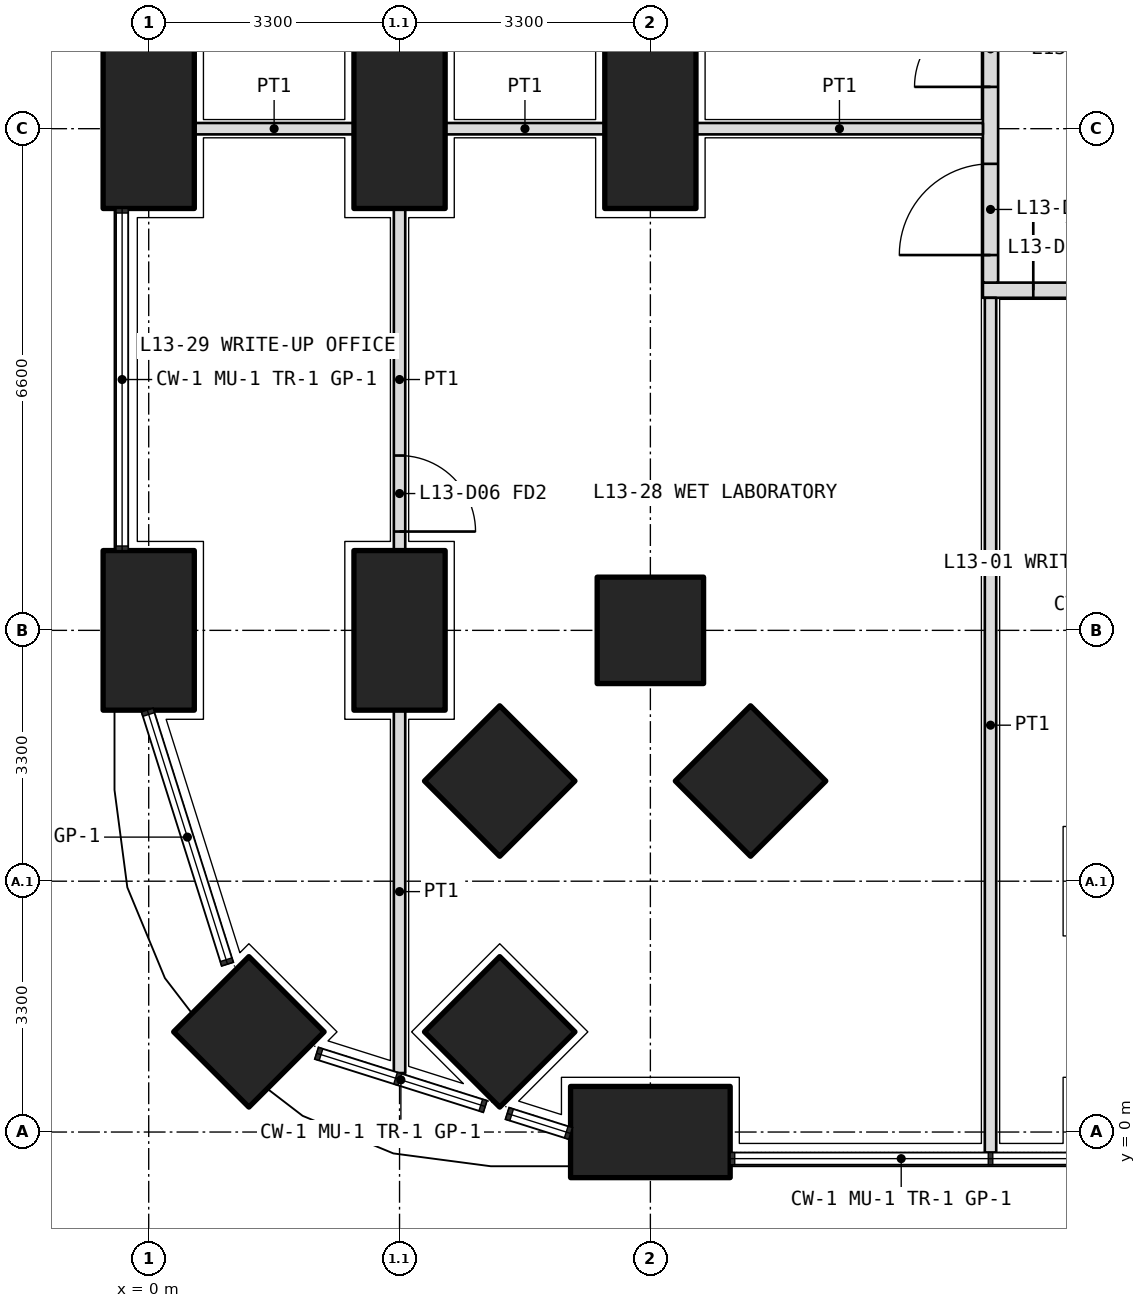
"""IFC4 building model, lengths in metres.
Left out: names, types, materials, properties, quantities, classifications, styles, units other than length and angle.
Written with IfcOpenShell. Run it as: python <this file> out.ifc"""

import sys

from ifc_helpers import new_model, si_unit, direction, frame, frame_2d, origin, origin_2d, place, context, subcontext, project, spatial, rectangle, extrude, element, fill, save


model = new_model("IFC4")
c1 = context("Model", 3, precision=1e-05, world=origin(), true_north=direction((0.0, 1.0)))
c2 = subcontext(c1, "Body", "Model", "MODEL_VIEW")
j1 = project(units=[si_unit("LENGTHUNIT", "METRE"), si_unit("PLANEANGLEUNIT", "RADIAN")], contexts=[c1])
p1 = place(None, origin())
s1 = spatial("IfcSite", under=j1, at=p1, CompositionType="ELEMENT")
p2 = place(p1, origin())
s2 = spatial("IfcBuilding", under=s1, at=p2, CompositionType="ELEMENT")
p3 = place(p2, frame((0.0, 0.0, 59.1)))
s3 = spatial("IfcBuildingStorey", under=s2, at=p3, CompositionType="ELEMENT", Elevation=59.1)
p4 = place(p3, frame((1.318, 1.318, 0.0), z_axis=(0.0, 0.0, 1.0), x_axis=(0.707106781187, 0.707106781187, 0.0)))
e1 = element("IfcColumn", 1, at=p4, inside=s3, PredefinedType="COLUMN", context=c2, shape_type="SweptSolid", body=[
    extrude(rectangle(XDim=1.4, YDim=1.4, at=origin_2d()), origin(), (0.0, 0.0, 1.0), 4.2),
])
for number, where, z_axis, x_axis in (
    (2, (6.6, 0.0, 0.0), (0.0, 0.0, 1.0), (1.0, 0.0, 0.0)),
    (3, (0.0, 6.6, 0.0), (0.0, 0.0, 1.0), (0.0, 1.0, 0.0)),
    (4, (0.0, 13.2, 0.0), (0.0, 0.0, 1.0), (0.0, 1.0, 0.0)),
):
    element("IfcColumn", number, at=place(p3, frame(where, z_axis=z_axis, x_axis=x_axis)), inside=s3, PredefinedType="COLUMN", context=c2, shape_type="SweptSolid", body=[
        extrude(rectangle(XDim=2.1, YDim=1.2, at=origin_2d()), origin(), (0.0, 0.0, 1.0), 4.2),
    ])
for number, where, z_axis, x_axis in (
    (5, (6.6, 6.6, 0.0), (0.0, 0.0, 1.0), (1.0, 0.0, 0.0)),
    (6, (4.618, 1.318, 0.0), (0.0, 0.0, 1.0), (0.707, 0.707, 0.0)),
):
    element("IfcColumn", number, at=place(p3, frame(where, z_axis=z_axis, x_axis=x_axis)), inside=s3, PredefinedType="COLUMN", context=c2, shape_type="SweptSolid", body=[
        extrude(rectangle(XDim=1.4, YDim=1.4, at=origin_2d()), origin(), (0.0, 0.0, 1.0), 4.2),
    ])
for number, where, z_axis, x_axis in (
    (7, (3.3, 6.6, 0.0), (0.0, 0.0, 1.0), (0.0, 1.0, 0.0)),
    (8, (3.3, 13.2, 0.0), (0.0, 0.0, 1.0), (0.0, 1.0, 0.0)),
):
    element("IfcColumn", number, at=place(p3, frame(where, z_axis=z_axis, x_axis=x_axis)), inside=s3, PredefinedType="COLUMN", context=c2, shape_type="SweptSolid", body=[
        extrude(rectangle(XDim=2.1, YDim=1.2, at=origin_2d()), origin(), (0.0, 0.0, 1.0), 4.2),
    ])
for number, where, z_axis, x_axis in (
    (9, (4.618, 4.618, 0.0), (0.0, 0.0, 1.0), (0.707, 0.707, 0.0)),
    (10, (7.918, 4.618, 0.0), (0.0, 0.0, 1.0), (0.707, 0.707, 0.0)),
):
    element("IfcColumn", number, at=place(p3, frame(where, z_axis=z_axis, x_axis=x_axis)), inside=s3, PredefinedType="COLUMN", context=c2, shape_type="SweptSolid", body=[
        extrude(rectangle(XDim=1.4, YDim=1.4, at=origin_2d()), origin(), (0.0, 0.0, 1.0), 4.2),
    ])
p5 = place(p3, frame((6.6, 13.2, 0.0), z_axis=(0.0, 0.0, 1.0), x_axis=(0.0, 1.0, 0.0)))
e11 = element("IfcColumn", 11, at=p5, inside=s3, PredefinedType="COLUMN", context=c2, shape_type="SweptSolid", body=[
    extrude(rectangle(XDim=2.1, YDim=1.2, at=origin_2d()), origin(), (0.0, 0.0, 1.0), 4.2),
])
p6 = place(p3, frame((10.975, 11.075, 0.0), z_axis=(0.0, 0.0, 1.0), x_axis=(1.0, 0.0, 0.0)))
e12 = element("IfcWall", 12, at=p6, inside=s3, PredefinedType="PARTITIONING", context=c2, shape_type="SweptSolid", body=[
    extrude(rectangle(XDim=30.85, YDim=0.2, at=frame_2d((15.425, 0.0))), origin(), (0.0, 0.0, 1.0), 2.85),
])
p7 = place(p6, frame((0.663, 0.0, 0.0)))
e13 = element("IfcOpeningElement", 13, at=p7, cuts=e12, PredefinedType="OPENING", context=c2, shape_type="SweptSolid", body=[
    extrude(rectangle(XDim=1.0, YDim=2.1, at=frame_2d((0.5, 1.05))), frame((0.0, 0.11, 0.0), z_axis=(0.0, -1.0, 0.0), x_axis=(1.0, 0.0, 0.0)), (0.0, 0.0, 1.0), 0.22),
])
p8 = place(p6, frame((3.275, 0.0, 0.0)))
e14 = element("IfcOpeningElement", 14, at=p8, cuts=e12, PredefinedType="OPENING", context=c2, shape_type="SweptSolid", body=[
    extrude(rectangle(XDim=1.2, YDim=2.1, at=frame_2d((0.6, 1.05))), frame((0.0, 0.11, 0.0), z_axis=(0.0, -1.0, 0.0), x_axis=(1.0, 0.0, 0.0)), (0.0, 0.0, 1.0), 0.22),
])
p9 = place(p6, frame((6.775, 0.0, 0.0)))
e15 = element("IfcOpeningElement", 15, at=p9, cuts=e12, PredefinedType="OPENING", context=c2, shape_type="SweptSolid", body=[
    extrude(rectangle(XDim=1.0, YDim=2.1, at=frame_2d((0.5, 1.05))), frame((0.0, 0.11, 0.0), z_axis=(0.0, -1.0, 0.0), x_axis=(1.0, 0.0, 0.0)), (0.0, 0.0, 1.0), 0.22),
])
p10 = place(p6, frame((10.075, 0.0, 0.0)))
e16 = element("IfcOpeningElement", 16, at=p10, cuts=e12, PredefinedType="OPENING", context=c2, shape_type="SweptSolid", body=[
    extrude(rectangle(XDim=1.0, YDim=2.1, at=frame_2d((0.5, 1.05))), frame((0.0, 0.11, 0.0), z_axis=(0.0, -1.0, 0.0), x_axis=(1.0, 0.0, 0.0)), (0.0, 0.0, 1.0), 0.22),
])
p11 = place(p6, frame((14.825, 0.0, 0.0)))
e17 = element("IfcOpeningElement", 17, at=p11, cuts=e12, PredefinedType="OPENING", context=c2, shape_type="SweptSolid", body=[
    extrude(rectangle(XDim=1.2, YDim=2.1, at=frame_2d((0.6, 1.05))), frame((0.0, 0.11, 0.0), z_axis=(0.0, -1.0, 0.0), x_axis=(1.0, 0.0, 0.0)), (0.0, 0.0, 1.0), 0.22),
])
p12 = place(p6, frame((19.875, 0.0, 0.0)))
e18 = element("IfcOpeningElement", 18, at=p12, cuts=e12, PredefinedType="OPENING", context=c2, shape_type="SweptSolid", body=[
    extrude(rectangle(XDim=1.0, YDim=2.1, at=frame_2d((0.5, 1.05))), frame((0.0, 0.11, 0.0), z_axis=(0.0, -1.0, 0.0), x_axis=(1.0, 0.0, 0.0)), (0.0, 0.0, 1.0), 0.22),
])
p13 = place(p6, frame((25.887, 0.0, 0.0)))
e19 = element("IfcOpeningElement", 19, at=p13, cuts=e12, PredefinedType="OPENING", context=c2, shape_type="SweptSolid", body=[
    extrude(rectangle(XDim=1.0, YDim=2.1, at=frame_2d((0.5, 1.05))), frame((0.0, 0.11, 0.0), z_axis=(0.0, -1.0, 0.0), x_axis=(1.0, 0.0, 0.0)), (0.0, 0.0, 1.0), 0.22),
])
p14 = place(p3, frame((11.075, 11.175, 0.0), z_axis=(0.0, 0.0, 1.0), x_axis=(0.0, 1.0, 0.0)))
e20 = element("IfcWall", 20, at=p14, inside=s3, PredefinedType="PARTITIONING", context=c2, shape_type="SweptSolid", body=[
    extrude(rectangle(XDim=23.85, YDim=0.2, at=frame_2d((11.925, 0.0))), origin(), (0.0, 0.0, 1.0), 2.85),
])
p15 = place(p14, frame((0.363, 0.0, 0.0)))
e21 = element("IfcOpeningElement", 21, at=p15, cuts=e20, PredefinedType="OPENING", context=c2, shape_type="SweptSolid", body=[
    extrude(rectangle(XDim=1.2, YDim=2.1, at=frame_2d((0.6, 1.05))), frame((0.0, 0.11, 0.0), z_axis=(0.0, -1.0, 0.0), x_axis=(1.0, 0.0, 0.0)), (0.0, 0.0, 1.0), 0.22),
])
p16 = place(p14, frame((2.575, 0.0, 0.0)))
e22 = element("IfcOpeningElement", 22, at=p16, cuts=e20, PredefinedType="OPENING", context=c2, shape_type="SweptSolid", body=[
    extrude(rectangle(XDim=1.0, YDim=2.1, at=frame_2d((0.5, 1.05))), frame((0.0, 0.11, 0.0), z_axis=(0.0, -1.0, 0.0), x_axis=(1.0, 0.0, 0.0)), (0.0, 0.0, 1.0), 0.22),
])
p17 = place(p14, frame((5.65, 0.0, 0.0)))
e23 = element("IfcOpeningElement", 23, at=p17, cuts=e20, PredefinedType="OPENING", context=c2, shape_type="SweptSolid", body=[
    extrude(rectangle(XDim=0.9, YDim=2.1, at=frame_2d((0.45, 1.05))), frame((0.0, 0.11, 0.0), z_axis=(0.0, -1.0, 0.0), x_axis=(1.0, 0.0, 0.0)), (0.0, 0.0, 1.0), 0.22),
])
p18 = place(p14, frame((9.5, 0.0, 0.0)))
e24 = element("IfcOpeningElement", 24, at=p18, cuts=e20, PredefinedType="OPENING", context=c2, shape_type="SweptSolid", body=[
    extrude(rectangle(XDim=0.9, YDim=2.1, at=frame_2d((0.45, 1.05))), frame((0.0, 0.11, 0.0), z_axis=(0.0, -1.0, 0.0), x_axis=(1.0, 0.0, 0.0)), (0.0, 0.0, 1.0), 0.22),
])
p19 = place(p14, frame((13.025, 0.0, 0.0)))
e25 = element("IfcOpeningElement", 25, at=p19, cuts=e20, PredefinedType="OPENING", context=c2, shape_type="SweptSolid", body=[
    extrude(rectangle(XDim=1.0, YDim=2.1, at=frame_2d((0.5, 1.05))), frame((0.0, 0.11, 0.0), z_axis=(0.0, -1.0, 0.0), x_axis=(1.0, 0.0, 0.0)), (0.0, 0.0, 1.0), 0.22),
])
p20 = place(p14, frame((18.025, 0.0, 0.0)))
e26 = element("IfcOpeningElement", 26, at=p20, cuts=e20, PredefinedType="OPENING", context=c2, shape_type="SweptSolid", body=[
    extrude(rectangle(XDim=1.0, YDim=2.1, at=frame_2d((0.5, 1.05))), frame((0.0, 0.11, 0.0), z_axis=(0.0, -1.0, 0.0), x_axis=(1.0, 0.0, 0.0)), (0.0, 0.0, 1.0), 0.22),
])
p21 = place(p14, frame((22.387, 0.0, 0.0)))
e27 = element("IfcOpeningElement", 27, at=p21, cuts=e20, PredefinedType="OPENING", context=c2, shape_type="SweptSolid", body=[
    extrude(rectangle(XDim=1.0, YDim=2.1, at=frame_2d((0.5, 1.05))), frame((0.0, 0.11, 0.0), z_axis=(0.0, -1.0, 0.0), x_axis=(1.0, 0.0, 0.0)), (0.0, 0.0, 1.0), 0.22),
])
p22 = place(p3, frame((11.075, -0.27, 0.0), z_axis=(0.0, 0.0, 1.0), x_axis=(0.0, 1.0, 0.0)))
e28 = element("IfcWall", 28, at=p22, inside=s3, PredefinedType="PARTITIONING", context=c2, shape_type="SweptSolid", body=[
    extrude(rectangle(XDim=11.245, YDim=0.15, at=frame_2d((5.623, 0.0))), origin(), (0.0, 0.0, 1.0), 2.7),
])
p23 = place(p3, frame((3.3, 12.15, 0.0), z_axis=(0.0, 0.0, 1.0), x_axis=(0.0, -1.0, 0.0)))
e29 = element("IfcWall", 29, at=p23, inside=s3, PredefinedType="PARTITIONING", context=c2, shape_type="SweptSolid", body=[
    extrude(rectangle(XDim=4.5, YDim=0.15, at=frame_2d((2.25, 0.0))), origin(), (0.0, 0.0, 1.0), 3.9),
])
p24 = place(p23, frame((3.25, 0.0, 0.0)))
e30 = element("IfcOpeningElement", 30, at=p24, cuts=e29, PredefinedType="OPENING", context=c2, shape_type="SweptSolid", body=[
    extrude(rectangle(XDim=1.0, YDim=2.1, at=frame_2d((0.5, 1.05))), frame((0.0, 0.085, 0.0), z_axis=(0.0, -1.0, 0.0), x_axis=(1.0, 0.0, 0.0)), (0.0, 0.0, 1.0), 0.17),
])
p25 = place(p3, frame((3.3, 5.55, 0.0), z_axis=(0.0, 0.0, 1.0), x_axis=(0.0, -1.0, 0.0)))
e31 = element("IfcWall", 31, at=p25, inside=s3, PredefinedType="PARTITIONING", context=c2, shape_type="SweptSolid", body=[
    extrude(rectangle(XDim=4.774, YDim=0.15, at=frame_2d((2.387, 0.0))), origin(), (0.0, 0.0, 1.0), 2.7),
])
p26 = place(p3, frame((0.6, 13.2, 0.0), z_axis=(0.0, 0.0, 1.0), x_axis=(1.0, 0.0, 0.0)))
e32 = element("IfcWall", 32, at=p26, inside=s3, PredefinedType="PARTITIONING", context=c2, shape_type="SweptSolid", body=[
    extrude(rectangle(XDim=2.1, YDim=0.15, at=frame_2d((1.05, 0.0))), origin(), (0.0, 0.0, 1.0), 2.85),
])
p27 = place(p3, frame((3.9, 13.2, 0.0), z_axis=(0.0, 0.0, 1.0), x_axis=(1.0, 0.0, 0.0)))
e33 = element("IfcWall", 33, at=p27, inside=s3, PredefinedType="PARTITIONING", context=c2, shape_type="SweptSolid", body=[
    extrude(rectangle(XDim=2.1, YDim=0.15, at=frame_2d((1.05, 0.0))), origin(), (0.0, 0.0, 1.0), 2.85),
])
p28 = place(p3, frame((7.2, 13.2, 0.0), z_axis=(0.0, 0.0, 1.0), x_axis=(1.0, 0.0, 0.0)))
e34 = element("IfcWall", 34, at=p28, inside=s3, PredefinedType="PARTITIONING", context=c2, shape_type="SweptSolid", body=[
    extrude(rectangle(XDim=3.775, YDim=0.15, at=frame_2d((1.888, 0.0))), origin(), (0.0, 0.0, 1.0), 2.85),
])
p29 = place(p7, origin())
e35 = element("IfcDoor", 35, at=p29, inside=s3, OperationType="SINGLE_SWING_LEFT", PredefinedType="DOOR", context=c2, shape_type="SweptSolid", body=[
    extrude(rectangle(XDim=1.0, YDim=2.1, at=frame_2d((0.5, 1.05))), frame((0.0, 0.025, 0.0), z_axis=(0.0, -1.0, 0.0), x_axis=(1.0, 0.0, 0.0)), (0.0, 0.0, 1.0), 0.05),
])
fill(e13, e35)
p30 = place(p15, origin())
e36 = element("IfcDoor", 36, at=p30, inside=s3, OperationType="DOUBLE_DOOR_SINGLE_SWING", PredefinedType="DOOR", context=c2, shape_type="SweptSolid", body=[
    extrude(rectangle(XDim=1.2, YDim=2.1, at=frame_2d((0.6, 1.05))), frame((0.0, 0.025, 0.0), z_axis=(0.0, -1.0, 0.0), x_axis=(1.0, 0.0, 0.0)), (0.0, 0.0, 1.0), 0.05),
])
fill(e21, e36)
p31 = place(p24, origin())
e37 = element("IfcDoor", 37, at=p31, inside=s3, OperationType="SINGLE_SWING_RIGHT", PredefinedType="DOOR", context=c2, shape_type="SweptSolid", body=[
    extrude(rectangle(XDim=1.0, YDim=2.1, at=frame_2d((0.5, 1.05))), frame((0.0, 0.025, 0.0), z_axis=(0.0, -1.0, 0.0), x_axis=(1.0, 0.0, 0.0)), (0.0, 0.0, 1.0), 0.05),
])
fill(e30, e37)
p32 = place(p16, origin())
e38 = element("IfcDoor", 38, at=p32, inside=s3, OperationType="SINGLE_SWING_LEFT", PredefinedType="DOOR", context=c2, shape_type="SweptSolid", body=[
    extrude(rectangle(XDim=1.0, YDim=2.1, at=frame_2d((0.5, 1.05))), frame((0.0, 0.025, 0.0), z_axis=(0.0, -1.0, 0.0), x_axis=(1.0, 0.0, 0.0)), (0.0, 0.0, 1.0), 0.05),
])
fill(e22, e38)
save(model, sys.argv[1])
